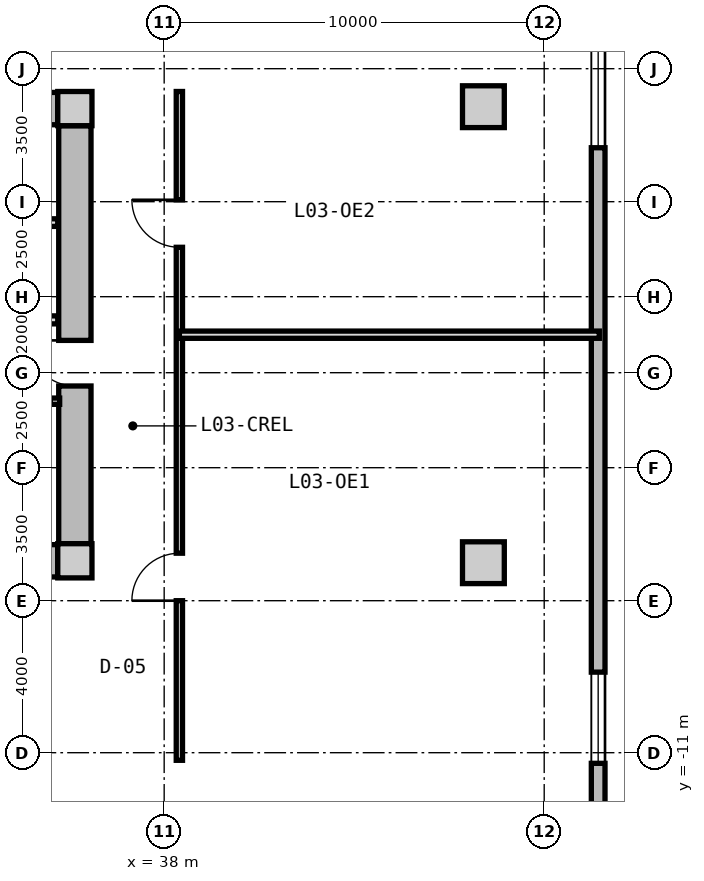
"""IFC4 building model, lengths in metres.
Left out: names, types, materials, properties, quantities, classifications, styles, units other than length and angle.
Written with IfcOpenShell. Run it as: python <this file> out.ifc"""

import sys

from ifc_helpers import new_model, si_unit, direction, frame, frame_2d, origin, origin_2d, place, context, subcontext, project, spatial, rectangle, extrude, source, transform, mapped, element, fill, save


model = new_model("IFC4")
c1 = context("Model", 3, precision=1e-05, world=origin(), true_north=direction((0.0, 1.0)))
c2 = subcontext(c1, "Body", "Model", "MODEL_VIEW")
j1 = project(units=[si_unit("LENGTHUNIT", "METRE"), si_unit("PLANEANGLEUNIT", "RADIAN")], contexts=[c1])
p1 = place(None, origin())
s1 = spatial("IfcSite", under=j1, at=p1, CompositionType="ELEMENT")
p2 = place(p1, origin())
s2 = spatial("IfcBuilding", under=s1, at=p2, CompositionType="ELEMENT")
p3 = place(p2, frame((0.0, 0.0, 12.6)))
s3 = spatial("IfcBuildingStorey", under=s2, at=p3, CompositionType="ELEMENT", Elevation=12.6)
m1 = source(origin(), c2, "Body", "SweptSolid", [
    extrude(rectangle(XDim=0.9, YDim=0.9, at=origin_2d()), origin(), (0.0, 0.0, 1.0), 4.2),
])
for number, where, z_axis, x_axis in (
    (1, (35.65, -5.95, 0.0), (0.0, 0.0, 1.0), (1.0, 0.0, 0.0)),
    (2, (35.65, 5.95, 0.0), (0.0, 0.0, 1.0), (1.0, 0.0, 0.0)),
):
    element("IfcColumn", number, at=place(p3, frame(where, z_axis=z_axis, x_axis=x_axis)), inside=s3, PredefinedType="COLUMN", context=c2, shape_type="MappedRepresentation", body=[
        mapped(m1, transform((0.0, 0.0, 0.0), x_axis=(1.0, 0.0, 0.0), y_axis=(0.0, 1.0, 0.0), z_axis=(0.0, 0.0, 1.0), scale=1.0)),
    ])
m2 = source(origin(), c2, "Body", "SweptSolid", [
    extrude(rectangle(XDim=14.4, YDim=0.85, at=frame_2d((7.2, 0.0))), origin(), (0.0, 0.0, 1.0), 3.88),
])
for number, where, z_axis, x_axis in (
    (3, (20.8, 5.95, 0.0), (0.0, 0.0, 1.0), (1.0, 0.0, 0.0)),
    (4, (35.2, -5.95, 0.0), (0.0, 0.0, 1.0), (-1.0, 0.0, 0.0)),
):
    element("IfcWall", number, at=place(p3, frame(where, z_axis=z_axis, x_axis=x_axis)), inside=s3, PredefinedType="SHEAR", context=c2, shape_type="MappedRepresentation", body=[
        mapped(m2, transform((0.0, 0.0, 0.0), x_axis=(1.0, 0.0, 0.0), y_axis=(0.0, 1.0, 0.0), z_axis=(0.0, 0.0, 1.0), scale=1.0)),
    ])
m3 = source(origin(), c2, "Body", "SweptSolid", [
    extrude(rectangle(XDim=11.0, YDim=0.85, at=frame_2d((5.5, 0.0))), origin(), (0.0, 0.0, 1.0), 3.88),
])
p4 = place(p3, frame((35.65, 5.5, 0.0), z_axis=(0.0, 0.0, 1.0), x_axis=(0.0, -1.0, 0.0)))
e5 = element("IfcWall", 5, at=p4, inside=s3, PredefinedType="SHEAR", context=c2, shape_type="MappedRepresentation", body=[
    mapped(m3, transform((0.0, 0.0, 0.0), x_axis=(1.0, 0.0, 0.0), y_axis=(0.0, 1.0, 0.0), z_axis=(0.0, 0.0, 1.0), scale=1.0)),
])
p5 = place(p4, frame((5.65, 0.0, 0.0)))
e6 = element("IfcOpeningElement", 6, at=p5, cuts=e5, PredefinedType="OPENING", context=c2, shape_type="SweptSolid", body=[
    extrude(rectangle(XDim=1.2, YDim=2.15, at=frame_2d((0.6, 1.075))), frame((0.0, 0.435, 0.0), z_axis=(0.0, -1.0, 0.0), x_axis=(1.0, 0.0, 0.0)), (0.0, 0.0, 1.0), 0.87),
])
m4 = source(origin(), c2, "Body", "SweptSolid", [
    extrude(rectangle(XDim=1.1, YDim=1.1, at=origin_2d()), origin(), (0.0, 0.0, 1.0), 4.2),
])
for number, where, z_axis, x_axis in (
    (7, (46.4, -6.0, 0.0), (0.0, 0.0, 1.0), (1.0, 0.0, 0.0)),
    (8, (46.4, 6.0, 0.0), (0.0, 0.0, 1.0), (1.0, 0.0, 0.0)),
):
    element("IfcColumn", number, at=place(p3, frame(where, z_axis=z_axis, x_axis=x_axis)), inside=s3, PredefinedType="COLUMN", context=c2, shape_type="MappedRepresentation", body=[
        mapped(m4, transform((0.0, 0.0, 0.0), x_axis=(1.0, 0.0, 0.0), y_axis=(0.0, 1.0, 0.0), z_axis=(0.0, 0.0, 1.0), scale=1.0)),
    ])
m5 = source(origin(), c2, "Body", "SweptSolid", [
    extrude(rectangle(XDim=40.64, YDim=0.36, at=frame_2d((20.32, 0.0))), origin(), (0.0, 0.0, 1.0), 3.88),
])
p6 = place(p3, frame((49.42, 20.32, 0.0), z_axis=(0.0, 0.0, 1.0), x_axis=(0.0, -1.0, 0.0)))
e9 = element("IfcWall", 9, at=p6, inside=s3, PredefinedType="SOLIDWALL", context=c2, shape_type="MappedRepresentation", body=[
    mapped(m5, transform((0.0, 0.0, 0.0), x_axis=(1.0, 0.0, 0.0), y_axis=(0.0, 1.0, 0.0), z_axis=(0.0, 0.0, 1.0), scale=1.0)),
])
p7 = place(p6, frame((4.0, 0.0, 0.85)))
e10 = element("IfcOpeningElement", 10, at=p7, cuts=e9, PredefinedType="OPENING", context=c2, shape_type="SweptSolid", body=[
    extrude(rectangle(XDim=2.4, YDim=2.2, at=frame_2d((1.2, 1.1))), frame((0.0, 0.19, 0.0), z_axis=(0.0, -1.0, 0.0), x_axis=(1.0, 0.0, 0.0)), (0.0, 0.0, 1.0), 0.38),
])
p8 = place(p6, frame((12.4, 0.0, 0.85)))
e11 = element("IfcOpeningElement", 11, at=p8, cuts=e9, PredefinedType="OPENING", context=c2, shape_type="SweptSolid", body=[
    extrude(rectangle(XDim=3.0, YDim=2.1, at=frame_2d((1.5, 1.05))), frame((0.0, 0.19, 0.0), z_axis=(0.0, -1.0, 0.0), x_axis=(1.0, 0.0, 0.0)), (0.0, 0.0, 1.0), 0.38),
])
p9 = place(p6, frame((29.2, 0.0, 0.85)))
e12 = element("IfcOpeningElement", 12, at=p9, cuts=e9, PredefinedType="OPENING", context=c2, shape_type="SweptSolid", body=[
    extrude(rectangle(XDim=2.4, YDim=2.2, at=frame_2d((1.2, 1.1))), frame((0.0, 0.19, 0.0), z_axis=(0.0, -1.0, 0.0), x_axis=(1.0, 0.0, 0.0)), (0.0, 0.0, 1.0), 0.38),
])
m6 = source(origin(), c2, "Body", "SweptSolid", [
    extrude(rectangle(XDim=3.2, YDim=0.2, at=frame_2d((1.6, 0.0))), origin(), (0.0, 0.0, 1.0), 3.865),
])
p10 = place(p3, frame((32.0, 2.95, 0.0), z_axis=(0.0, 0.0, 1.0), x_axis=(1.0, 0.0, 0.0)))
e13 = element("IfcWall", 13, at=p10, inside=s3, PredefinedType="PARTITIONING", context=c2, shape_type="MappedRepresentation", body=[
    mapped(m6, transform((0.0, 0.0, 0.0), x_axis=(1.0, 0.0, 0.0), y_axis=(0.0, 1.0, 0.0), z_axis=(0.0, 0.0, 1.0), scale=1.0)),
])
m7 = source(origin(), c2, "Body", "SweptSolid", [
    extrude(rectangle(XDim=6.66, YDim=0.21, at=frame_2d((3.33, 0.0))), origin(), (0.0, 0.0, 1.0), 3.865),
])
p11 = place(p3, frame((28.54, 0.39, 0.0), z_axis=(0.0, 0.0, 1.0), x_axis=(1.0, 0.0, 0.0)))
e14 = element("IfcWall", 14, at=p11, inside=s3, PredefinedType="PARTITIONING", context=c2, shape_type="MappedRepresentation", body=[
    mapped(m7, transform((0.0, 0.0, 0.0), x_axis=(1.0, 0.0, 0.0), y_axis=(0.0, 1.0, 0.0), z_axis=(0.0, 0.0, 1.0), scale=1.0)),
])
p12 = place(p11, frame((1.0, 0.0, 0.0)))
e15 = element("IfcOpeningElement", 15, at=p12, cuts=e14, PredefinedType="OPENING", context=c2, shape_type="SweptSolid", body=[
    extrude(rectangle(XDim=1.2, YDim=2.15, at=frame_2d((0.6, 1.075))), frame((0.0, 0.115, 0.0), z_axis=(0.0, -1.0, 0.0), x_axis=(1.0, 0.0, 0.0)), (0.0, 0.0, 1.0), 0.23),
])
m8 = source(origin(), c2, "Body", "SweptSolid", [
    extrude(rectangle(XDim=2.7, YDim=0.165, at=frame_2d((1.35, 0.0))), origin(), (0.0, 0.0, 1.0), 3.865),
])
p13 = place(p3, frame((32.55, -1.75, 0.0), z_axis=(0.0, 0.0, 1.0), x_axis=(1.0, 0.0, 0.0)))
e16 = element("IfcWall", 16, at=p13, inside=s3, PredefinedType="PARTITIONING", context=c2, shape_type="MappedRepresentation", body=[
    mapped(m8, transform((0.0, 0.0, 0.0), x_axis=(1.0, 0.0, 0.0), y_axis=(0.0, 1.0, 0.0), z_axis=(0.0, 0.0, 1.0), scale=1.0)),
])
p14 = place(p13, frame((0.222, 0.0, 0.0)))
e17 = element("IfcOpeningElement", 17, at=p14, cuts=e16, PredefinedType="OPENING", context=c2, shape_type="SweptSolid", body=[
    extrude(rectangle(XDim=0.925, YDim=2.1, at=frame_2d((0.462, 1.05))), frame((0.0, 0.093, 0.0), z_axis=(0.0, -1.0, 0.0), x_axis=(1.0, 0.0, 0.0)), (0.0, 0.0, 1.0), 0.185),
])
p15 = place(p13, frame((1.522, 0.0, 0.0)))
e18 = element("IfcOpeningElement", 18, at=p15, cuts=e16, PredefinedType="OPENING", context=c2, shape_type="SweptSolid", body=[
    extrude(rectangle(XDim=0.925, YDim=2.1, at=frame_2d((0.462, 1.05))), frame((0.0, 0.093, 0.0), z_axis=(0.0, -1.0, 0.0), x_axis=(1.0, 0.0, 0.0)), (0.0, 0.0, 1.0), 0.185),
])
m9 = source(origin(), c2, "Body", "SweptSolid", [
    extrude(rectangle(XDim=17.6, YDim=0.165, at=frame_2d((8.8, 0.0))), origin(), (0.0, 0.0, 1.0), 3.865),
])
p16 = place(p3, frame((38.4, -11.2, 0.0), z_axis=(0.0, 0.0, 1.0), x_axis=(0.0, 1.0, 0.0)))
e19 = element("IfcWall", 19, at=p16, inside=s3, PredefinedType="PARTITIONING", context=c2, shape_type="MappedRepresentation", body=[
    mapped(m9, transform((0.0, 0.0, 0.0), x_axis=(1.0, 0.0, 0.0), y_axis=(0.0, 1.0, 0.0), z_axis=(0.0, 0.0, 1.0), scale=1.0)),
])
p17 = place(p16, frame((4.2, 0.0, 0.0)))
e20 = element("IfcOpeningElement", 20, at=p17, cuts=e19, PredefinedType="OPENING", context=c2, shape_type="SweptSolid", body=[
    extrude(rectangle(XDim=1.25, YDim=2.2, at=frame_2d((0.625, 1.1))), frame((0.0, 0.093, 0.0), z_axis=(0.0, -1.0, 0.0), x_axis=(1.0, 0.0, 0.0)), (0.0, 0.0, 1.0), 0.185),
])
p18 = place(p16, frame((13.5, 0.0, 0.0)))
e21 = element("IfcOpeningElement", 21, at=p18, cuts=e19, PredefinedType="OPENING", context=c2, shape_type="SweptSolid", body=[
    extrude(rectangle(XDim=1.25, YDim=2.2, at=frame_2d((0.625, 1.1))), frame((0.0, 0.093, 0.0), z_axis=(0.0, -1.0, 0.0), x_axis=(1.0, 0.0, 0.0)), (0.0, 0.0, 1.0), 0.185),
])
m10 = source(origin(), c2, "Body", "SweptSolid", [
    extrude(rectangle(XDim=11.05, YDim=0.19, at=frame_2d((5.525, 0.0))), origin(), (0.0, 0.0, 1.0), 3.865),
])
p19 = place(p3, frame((38.4, 0.0, 0.0), z_axis=(0.0, 0.0, 1.0), x_axis=(1.0, 0.0, 0.0)))
e22 = element("IfcWall", 22, at=p19, inside=s3, PredefinedType="PARTITIONING", context=c2, shape_type="MappedRepresentation", body=[
    mapped(m10, transform((0.0, 0.0, 0.0), x_axis=(1.0, 0.0, 0.0), y_axis=(0.0, 1.0, 0.0), z_axis=(0.0, 0.0, 1.0), scale=1.0)),
])
m11 = source(origin(), c2, "Body", "SweptSolid", [
    extrude(rectangle(XDim=3.0, YDim=2.1, at=frame_2d((1.5, 1.05))), frame((0.0, 0.03, 0.0), z_axis=(0.0, -1.0, 0.0), x_axis=(1.0, 0.0, 0.0)), (0.0, 0.0, 1.0), 0.06),
])
p20 = place(p8, origin())
e23 = element("IfcWindow", 23, at=p20, inside=s3, PartitioningType="SINGLE_PANEL", PredefinedType="WINDOW", context=c2, shape_type="MappedRepresentation", body=[
    mapped(m11, transform((0.0, 0.0, 0.0), x_axis=(1.0, 0.0, 0.0), y_axis=(0.0, 1.0, 0.0), z_axis=(0.0, 0.0, 1.0), scale=1.0)),
])
fill(e11, e23)
m12 = source(origin(), c2, "Body", "SweptSolid", [
    extrude(rectangle(XDim=2.4, YDim=2.2, at=frame_2d((1.2, 1.1))), frame((0.0, 0.03, 0.0), z_axis=(0.0, -1.0, 0.0), x_axis=(1.0, 0.0, 0.0)), (0.0, 0.0, 1.0), 0.06),
])
p21 = place(p9, origin())
e24 = element("IfcWindow", 24, at=p21, inside=s3, PartitioningType="SINGLE_PANEL", PredefinedType="WINDOW", context=c2, shape_type="MappedRepresentation", body=[
    mapped(m12, transform((0.0, 0.0, 0.0), x_axis=(1.0, 0.0, 0.0), y_axis=(0.0, 1.0, 0.0), z_axis=(0.0, 0.0, 1.0), scale=1.0)),
])
fill(e12, e24)
m13 = source(origin(), c2, "Body", "SweptSolid", [
    extrude(rectangle(XDim=1.2, YDim=2.15, at=frame_2d((0.6, 1.075))), frame((0.0, 0.025, 0.0), z_axis=(0.0, -1.0, 0.0), x_axis=(1.0, 0.0, 0.0)), (0.0, 0.0, 1.0), 0.05),
])
p22 = place(p5, frame((1.2, 0.0, 0.0), z_axis=(0.0, 0.0, 1.0), x_axis=(-1.0, 0.0, 0.0)))
e25 = element("IfcDoor", 25, at=p22, inside=s3, OperationType="SINGLE_SWING_RIGHT", PredefinedType="DOOR", context=c2, shape_type="MappedRepresentation", body=[
    mapped(m13, transform((0.0, 0.0, 0.0), x_axis=(1.0, 0.0, 0.0), y_axis=(0.0, 1.0, 0.0), z_axis=(0.0, 0.0, 1.0), scale=1.0)),
])
fill(e6, e25)
m14 = source(origin(), c2, "Body", "SweptSolid", [
    extrude(rectangle(XDim=1.25, YDim=2.2, at=frame_2d((0.625, 1.1))), frame((0.0, 0.025, 0.0), z_axis=(0.0, -1.0, 0.0), x_axis=(1.0, 0.0, 0.0)), (0.0, 0.0, 1.0), 0.05),
])
p23 = place(p17, origin())
e26 = element("IfcDoor", 26, at=p23, inside=s3, OperationType="SINGLE_SWING_LEFT", PredefinedType="DOOR", context=c2, shape_type="MappedRepresentation", body=[
    mapped(m14, transform((0.0, 0.0, 0.0), x_axis=(1.0, 0.0, 0.0), y_axis=(0.0, 1.0, 0.0), z_axis=(0.0, 0.0, 1.0), scale=1.0)),
])
fill(e20, e26)
p24 = place(p18, origin())
e27 = element("IfcDoor", 27, at=p24, inside=s3, OperationType="SINGLE_SWING_RIGHT", PredefinedType="DOOR", context=c2, shape_type="MappedRepresentation", body=[
    mapped(m14, transform((0.0, 0.0, 0.0), x_axis=(1.0, 0.0, 0.0), y_axis=(0.0, 1.0, 0.0), z_axis=(0.0, 0.0, 1.0), scale=1.0)),
])
fill(e21, e27)
save(model, sys.argv[1])
